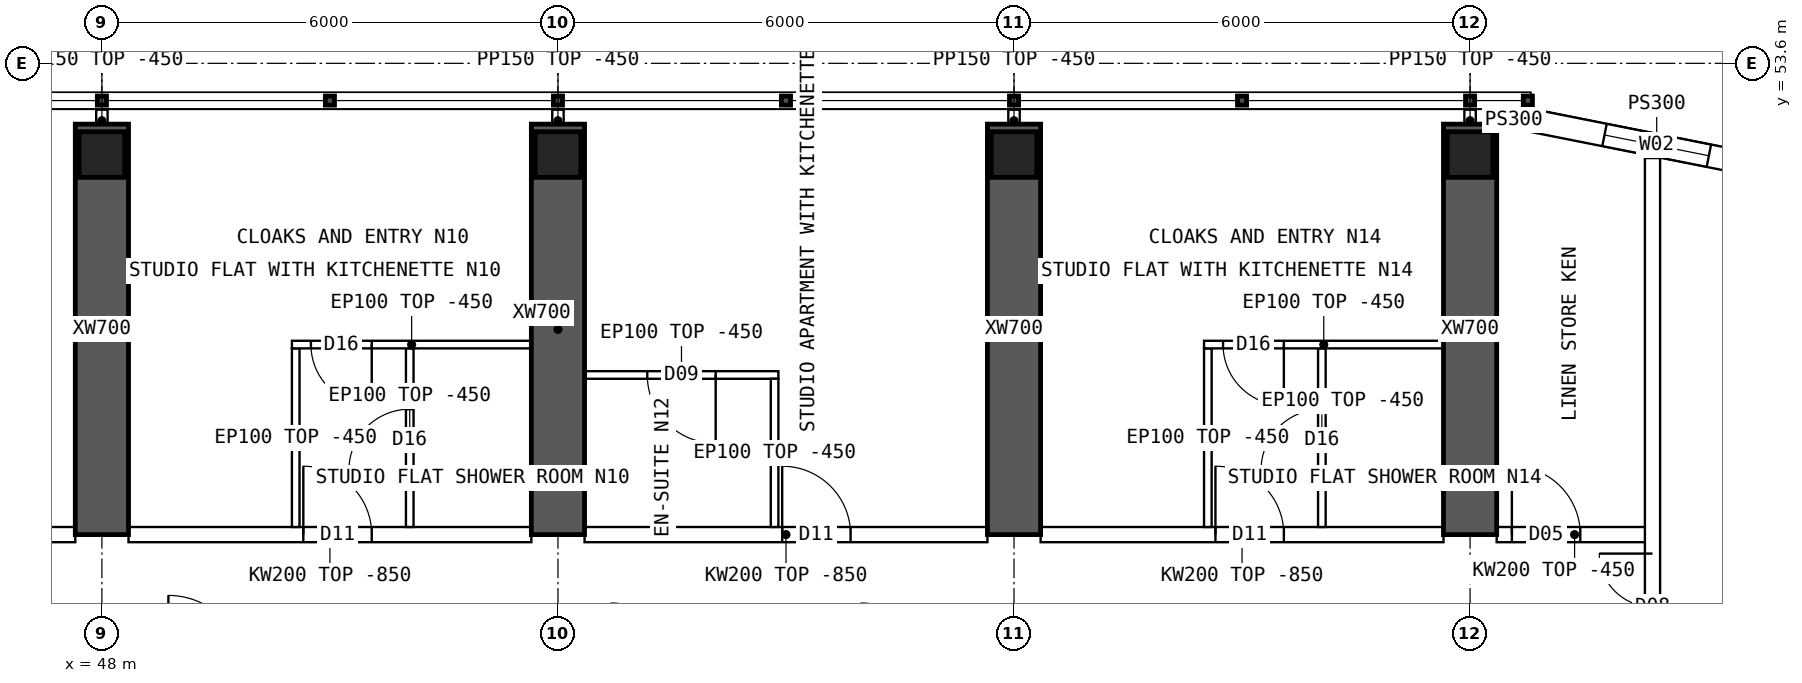
"""IFC4 building model, lengths in metres.
Left out: names, types, materials, properties, quantities, classifications, styles, units other than length and angle.
Written with IfcOpenShell. Run it as: python <this file> out.ifc"""

import sys

from ifc_helpers import new_model, si_unit, direction, frame, frame_2d, origin, origin_2d, place, context, subcontext, project, spatial, polyline, rectangle, hollow_rectangle, outline, extrude, element, fill, save


model = new_model("IFC4")
c1 = context("Model", 3, precision=1e-05, world=origin(), true_north=direction((0.0, 1.0)))
c2 = subcontext(c1, "Body", "Model", "MODEL_VIEW")
j1 = project(units=[si_unit("LENGTHUNIT", "METRE"), si_unit("PLANEANGLEUNIT", "RADIAN")], contexts=[c1])
p1 = place(None, origin())
s1 = spatial("IfcSite", under=j1, at=p1, CompositionType="ELEMENT")
p2 = place(p1, origin())
s2 = spatial("IfcBuilding", under=s1, at=p2, CompositionType="ELEMENT")
p3 = place(p2, frame((0.0, 0.0, 227.8)))
s3 = spatial("IfcBuildingStorey", under=s2, at=p3, CompositionType="ELEMENT", Elevation=227.8)
for number, where, z_axis, x_axis in (
    (1, (48.0, 52.4, 0.0), (0.0, 0.0, 1.0), (1.0, 0.0, 0.0)),
    (2, (54.0, 52.4, 0.0), (0.0, 0.0, 1.0), (1.0, 0.0, 0.0)),
    (3, (60.0, 52.4, 0.0), (0.0, 0.0, 1.0), (1.0, 0.0, 0.0)),
    (4, (66.0, 52.4, 0.0), (0.0, 0.0, 1.0), (1.0, 0.0, 0.0)),
):
    element("IfcColumn", number, at=place(p3, frame(where, z_axis=z_axis, x_axis=x_axis)), inside=s3, PredefinedType="COLUMN", context=c2, shape_type="SweptSolid", body=[
        extrude(hollow_rectangle(XDim=0.6, YDim=0.6, WallThickness=0.06, at=origin_2d()), origin(), (0.0, 0.0, 1.0), 3.75),
    ])
for number, where, z_axis, x_axis in (
    (5, (48.0, 47.4, 0.0), (0.0, 0.0, 1.0), (0.0, 1.0, 0.0)),
    (6, (54.0, 47.4, 0.0), (0.0, 0.0, 1.0), (0.0, 1.0, 0.0)),
    (7, (60.0, 47.4, 0.0), (0.0, 0.0, 1.0), (0.0, 1.0, 0.0)),
    (8, (66.0, 47.4, 0.0), (0.0, 0.0, 1.0), (0.0, 1.0, 0.0)),
):
    element("IfcWall", number, at=place(p3, frame(where, z_axis=z_axis, x_axis=x_axis)), inside=s3, PredefinedType="SHEAR", context=c2, shape_type="SweptSolid", body=[
        extrude(rectangle(XDim=5.4, YDim=0.7, at=frame_2d((2.7, 0.0))), origin(), (0.0, 0.0, 1.0), 3.75),
    ])
p4 = place(p3, frame((70.11, 52.192, 0.0), z_axis=(0.0, 0.0, 1.0), x_axis=(-0.98078325777, 0.195100490205, 0.0)))
e9 = element("IfcWall", 9, at=p4, inside=s3, PredefinedType="SOLIDWALL", context=c2, shape_type="SweptSolid", body=[
    extrude(outline(polyline([(-0.03, -0.15), (3.405, -0.15), (3.345, 0.15), (0.03, 0.15), (-0.03, -0.15)])), origin(), (0.0, 0.0, 1.0), 3.3),
])
p5 = place(p4, frame((0.988, 0.0, 0.9)))
e10 = element("IfcOpeningElement", 10, at=p5, cuts=e9, PredefinedType="OPENING", context=c2, shape_type="SweptSolid", body=[
    extrude(rectangle(XDim=1.4, YDim=1.8, at=frame_2d((0.7, 0.9))), frame((0.0, 0.16, 0.0), z_axis=(0.0, -1.0, 0.0), x_axis=(1.0, 0.0, 0.0)), (0.0, 0.0, 1.0), 0.32),
])
p6 = place(p3, frame((66.8, 52.85, 0.0), z_axis=(0.0, 0.0, 1.0), x_axis=(-1.0, 0.0, 0.0)))
e11 = element("IfcWall", 11, at=p6, inside=s3, PredefinedType="SOLIDWALL", context=c2, shape_type="SweptSolid", body=[
    extrude(rectangle(XDim=0.45, YDim=0.3, at=frame_2d((0.225, 0.0))), origin(), (0.0, 0.0, 1.0), 3.3),
])
p7 = place(p3, frame((42.35, 47.4, 0.0), z_axis=(0.0, 0.0, 1.0), x_axis=(1.0, 0.0, 0.0)))
e12 = element("IfcWall", 12, at=p7, inside=s3, PredefinedType="SOLIDWALL", context=c2, shape_type="SweptSolid", body=[
    extrude(outline(polyline([(0.0, 0.0), (5.3, 0.0), (5.3, 2.9), (0.0, 2.9), (0.0, 0.0)])), frame((0.0, 0.1, 0.0), z_axis=(0.0, -1.0, 0.0), x_axis=(1.0, 0.0, 0.0)), (0.0, 0.0, 1.0), 0.2),
])
p8 = place(p7, frame((2.6, 0.0, 0.0)))
e13 = element("IfcOpeningElement", 13, at=p8, cuts=e12, PredefinedType="OPENING", context=c2, shape_type="SweptSolid", body=[
    extrude(rectangle(XDim=0.9, YDim=2.1, at=frame_2d((0.45, 1.05))), frame((0.0, 0.11, 0.0), z_axis=(0.0, -1.0, 0.0), x_axis=(1.0, 0.0, 0.0)), (0.0, 0.0, 1.0), 0.22),
])
p9 = place(p3, frame((48.35, 47.4, 0.0), z_axis=(0.0, 0.0, 1.0), x_axis=(1.0, 0.0, 0.0)))
e14 = element("IfcWall", 14, at=p9, inside=s3, PredefinedType="SOLIDWALL", context=c2, shape_type="SweptSolid", body=[
    extrude(outline(polyline([(0.0, 0.0), (5.3, 0.0), (5.3, 2.9), (0.0, 2.9), (0.0, 0.0)])), frame((0.0, 0.1, 0.0), z_axis=(0.0, -1.0, 0.0), x_axis=(1.0, 0.0, 0.0)), (0.0, 0.0, 1.0), 0.2),
])
p10 = place(p9, frame((2.3, 0.0, 0.0)))
e15 = element("IfcOpeningElement", 15, at=p10, cuts=e14, PredefinedType="OPENING", context=c2, shape_type="SweptSolid", body=[
    extrude(rectangle(XDim=0.9, YDim=2.1, at=frame_2d((0.45, 1.05))), frame((0.0, 0.11, 0.0), z_axis=(0.0, -1.0, 0.0), x_axis=(1.0, 0.0, 0.0)), (0.0, 0.0, 1.0), 0.22),
])
p11 = place(p3, frame((54.35, 47.4, 0.0), z_axis=(0.0, 0.0, 1.0), x_axis=(1.0, 0.0, 0.0)))
e16 = element("IfcWall", 16, at=p11, inside=s3, PredefinedType="SOLIDWALL", context=c2, shape_type="SweptSolid", body=[
    extrude(outline(polyline([(0.0, 0.0), (5.3, 0.0), (5.3, 2.9), (0.0, 2.9), (0.0, 0.0)])), frame((0.0, 0.1, 0.0), z_axis=(0.0, -1.0, 0.0), x_axis=(1.0, 0.0, 0.0)), (0.0, 0.0, 1.0), 0.2),
])
p12 = place(p11, frame((2.6, 0.0, 0.0)))
e17 = element("IfcOpeningElement", 17, at=p12, cuts=e16, PredefinedType="OPENING", context=c2, shape_type="SweptSolid", body=[
    extrude(rectangle(XDim=0.9, YDim=2.1, at=frame_2d((0.45, 1.05))), frame((0.0, 0.11, 0.0), z_axis=(0.0, -1.0, 0.0), x_axis=(1.0, 0.0, 0.0)), (0.0, 0.0, 1.0), 0.22),
])
p13 = place(p3, frame((60.35, 47.4, 0.0), z_axis=(0.0, 0.0, 1.0), x_axis=(1.0, 0.0, 0.0)))
e18 = element("IfcWall", 18, at=p13, inside=s3, PredefinedType="SOLIDWALL", context=c2, shape_type="SweptSolid", body=[
    extrude(outline(polyline([(0.0, 0.0), (5.3, 0.0), (5.3, 2.9), (0.0, 2.9), (0.0, 0.0)])), frame((0.0, 0.1, 0.0), z_axis=(0.0, -1.0, 0.0), x_axis=(1.0, 0.0, 0.0)), (0.0, 0.0, 1.0), 0.2),
])
p14 = place(p13, frame((2.3, 0.0, 0.0)))
e19 = element("IfcOpeningElement", 19, at=p14, cuts=e18, PredefinedType="OPENING", context=c2, shape_type="SweptSolid", body=[
    extrude(rectangle(XDim=0.9, YDim=2.1, at=frame_2d((0.45, 1.05))), frame((0.0, 0.11, 0.0), z_axis=(0.0, -1.0, 0.0), x_axis=(1.0, 0.0, 0.0)), (0.0, 0.0, 1.0), 0.22),
])
p15 = place(p3, frame((66.35, 47.4, 0.0), z_axis=(0.0, 0.0, 1.0), x_axis=(1.0, 0.0, 0.0)))
e20 = element("IfcWall", 20, at=p15, inside=s3, PredefinedType="SOLIDWALL", context=c2, shape_type="SweptSolid", body=[
    extrude(rectangle(XDim=2.05, YDim=0.2, at=frame_2d((1.025, 0.0))), origin(), (0.0, 0.0, 1.0), 3.3),
])
p16 = place(p15, frame((0.2, 0.0, 0.0)))
e21 = element("IfcOpeningElement", 21, at=p16, cuts=e20, PredefinedType="OPENING", context=c2, shape_type="SweptSolid", body=[
    extrude(rectangle(XDim=0.9, YDim=2.1, at=frame_2d((0.45, 1.05))), frame((0.0, 0.11, 0.0), z_axis=(0.0, -1.0, 0.0), x_axis=(1.0, 0.0, 0.0)), (0.0, 0.0, 1.0), 0.22),
])
p17 = place(p3, frame((50.5, 49.9, 0.0), z_axis=(0.0, 0.0, 1.0), x_axis=(1.0, 0.0, 0.0)))
e22 = element("IfcWall", 22, at=p17, inside=s3, PredefinedType="PARTITIONING", context=c2, shape_type="SweptSolid", body=[
    extrude(rectangle(XDim=3.15, YDim=0.1, at=frame_2d((1.575, 0.0))), origin(), (0.0, 0.0, 1.0), 3.3),
])
p18 = place(p17, frame((0.25, 0.0, 0.0)))
e23 = element("IfcOpeningElement", 23, at=p18, cuts=e22, PredefinedType="OPENING", context=c2, shape_type="SweptSolid", body=[
    extrude(rectangle(XDim=0.8, YDim=2.1, at=frame_2d((0.4, 1.05))), frame((0.0, 0.06, 0.0), z_axis=(0.0, -1.0, 0.0), x_axis=(1.0, 0.0, 0.0)), (0.0, 0.0, 1.0), 0.12),
])
p19 = place(p3, frame((50.55, 49.85, 0.0), z_axis=(0.0, 0.0, 1.0), x_axis=(0.0, -1.0, 0.0)))
e24 = element("IfcWall", 24, at=p19, inside=s3, PredefinedType="PARTITIONING", context=c2, shape_type="SweptSolid", body=[
    extrude(outline(polyline([(0.0, 0.0), (2.35, 0.0), (2.35, 2.9), (2.302, 2.9), (2.3, 3.3), (0.0, 3.3), (0.0, 0.0)])), frame((0.0, 0.05, 0.0), z_axis=(0.0, -1.0, 0.0), x_axis=(1.0, 0.0, 0.0)), (0.0, 0.0, 1.0), 0.1),
])
p20 = place(p3, frame((52.05, 49.85, 0.0), z_axis=(0.0, 0.0, 1.0), x_axis=(0.0, -1.0, 0.0)))
e25 = element("IfcWall", 25, at=p20, inside=s3, PredefinedType="PARTITIONING", context=c2, shape_type="SweptSolid", body=[
    extrude(outline(polyline([(0.0, 0.0), (2.35, 0.0), (2.35, 2.9), (2.302, 2.9), (2.3, 3.3), (0.0, 3.3), (0.0, 0.0)])), frame((0.0, 0.05, 0.0), z_axis=(0.0, -1.0, 0.0), x_axis=(1.0, 0.0, 0.0)), (0.0, 0.0, 1.0), 0.1),
])
p21 = place(p20, frame((0.8, 0.0, 0.0)))
e26 = element("IfcOpeningElement", 26, at=p21, cuts=e25, PredefinedType="OPENING", context=c2, shape_type="SweptSolid", body=[
    extrude(rectangle(XDim=0.8, YDim=2.1, at=frame_2d((0.4, 1.05))), frame((0.0, 0.06, 0.0), z_axis=(0.0, -1.0, 0.0), x_axis=(1.0, 0.0, 0.0)), (0.0, 0.0, 1.0), 0.12),
])
p22 = place(p3, frame((54.35, 49.5, 0.0), z_axis=(0.0, 0.0, 1.0), x_axis=(1.0, 0.0, 0.0)))
e27 = element("IfcWall", 27, at=p22, inside=s3, PredefinedType="PARTITIONING", context=c2, shape_type="SweptSolid", body=[
    extrude(rectangle(XDim=2.55, YDim=0.1, at=frame_2d((1.275, 0.0))), origin(), (0.0, 0.0, 1.0), 3.3),
])
p23 = place(p22, frame((0.825, 0.0, 0.0)))
e28 = element("IfcOpeningElement", 28, at=p23, cuts=e27, PredefinedType="OPENING", context=c2, shape_type="SweptSolid", body=[
    extrude(rectangle(XDim=0.9, YDim=2.1, at=frame_2d((0.45, 1.05))), frame((0.0, 0.06, 0.0), z_axis=(0.0, -1.0, 0.0), x_axis=(1.0, 0.0, 0.0)), (0.0, 0.0, 1.0), 0.12),
])
p24 = place(p3, frame((56.85, 49.45, 0.0), z_axis=(0.0, 0.0, 1.0), x_axis=(0.0, -1.0, 0.0)))
e29 = element("IfcWall", 29, at=p24, inside=s3, PredefinedType="PARTITIONING", context=c2, shape_type="SweptSolid", body=[
    extrude(outline(polyline([(0.0, 0.0), (1.95, 0.0), (1.95, 2.9), (1.902, 2.9), (1.9, 3.3), (0.0, 3.3), (0.0, 0.0)])), frame((0.0, 0.05, 0.0), z_axis=(0.0, -1.0, 0.0), x_axis=(1.0, 0.0, 0.0)), (0.0, 0.0, 1.0), 0.1),
])
p25 = place(p3, frame((62.5, 49.9, 0.0), z_axis=(0.0, 0.0, 1.0), x_axis=(1.0, 0.0, 0.0)))
e30 = element("IfcWall", 30, at=p25, inside=s3, PredefinedType="PARTITIONING", context=c2, shape_type="SweptSolid", body=[
    extrude(rectangle(XDim=3.15, YDim=0.1, at=frame_2d((1.575, 0.0))), origin(), (0.0, 0.0, 1.0), 3.3),
])
p26 = place(p25, frame((0.25, 0.0, 0.0)))
e31 = element("IfcOpeningElement", 31, at=p26, cuts=e30, PredefinedType="OPENING", context=c2, shape_type="SweptSolid", body=[
    extrude(rectangle(XDim=0.8, YDim=2.1, at=frame_2d((0.4, 1.05))), frame((0.0, 0.06, 0.0), z_axis=(0.0, -1.0, 0.0), x_axis=(1.0, 0.0, 0.0)), (0.0, 0.0, 1.0), 0.12),
])
p27 = place(p3, frame((62.55, 49.85, 0.0), z_axis=(0.0, 0.0, 1.0), x_axis=(0.0, -1.0, 0.0)))
e32 = element("IfcWall", 32, at=p27, inside=s3, PredefinedType="PARTITIONING", context=c2, shape_type="SweptSolid", body=[
    extrude(outline(polyline([(0.0, 0.0), (2.35, 0.0), (2.35, 2.9), (2.302, 2.9), (2.3, 3.3), (0.0, 3.3), (0.0, 0.0)])), frame((0.0, 0.05, 0.0), z_axis=(0.0, -1.0, 0.0), x_axis=(1.0, 0.0, 0.0)), (0.0, 0.0, 1.0), 0.1),
])
p28 = place(p3, frame((64.05, 49.85, 0.0), z_axis=(0.0, 0.0, 1.0), x_axis=(0.0, -1.0, 0.0)))
e33 = element("IfcWall", 33, at=p28, inside=s3, PredefinedType="PARTITIONING", context=c2, shape_type="SweptSolid", body=[
    extrude(outline(polyline([(0.0, 0.0), (2.35, 0.0), (2.35, 2.9), (2.302, 2.9), (2.3, 3.3), (0.0, 3.3), (0.0, 0.0)])), frame((0.0, 0.05, 0.0), z_axis=(0.0, -1.0, 0.0), x_axis=(1.0, 0.0, 0.0)), (0.0, 0.0, 1.0), 0.1),
])
p29 = place(p28, frame((0.8, 0.0, 0.0)))
e34 = element("IfcOpeningElement", 34, at=p29, cuts=e33, PredefinedType="OPENING", context=c2, shape_type="SweptSolid", body=[
    extrude(rectangle(XDim=0.8, YDim=2.1, at=frame_2d((0.4, 1.05))), frame((0.0, 0.06, 0.0), z_axis=(0.0, -1.0, 0.0), x_axis=(1.0, 0.0, 0.0)), (0.0, 0.0, 1.0), 0.12),
])
p30 = place(p3, frame((68.4, 11.646, 0.0), z_axis=(0.0, 0.0, 1.0), x_axis=(0.0, 1.0, 0.0)))
e35 = element("IfcWall", 35, at=p30, inside=s3, PredefinedType="SOLIDWALL", context=c2, shape_type="SweptSolid", body=[
    extrude(rectangle(XDim=40.708, YDim=0.2, at=frame_2d((20.354, 0.0))), origin(), (0.0, 0.0, 1.0), 3.3),
])
p31 = place(p30, frame((13.434, 0.0, 0.0)))
e36 = element("IfcOpeningElement", 36, at=p31, cuts=e35, PredefinedType="OPENING", context=c2, shape_type="SweptSolid", body=[
    extrude(rectangle(XDim=1.2, YDim=2.1, at=frame_2d((0.6, 1.05))), frame((0.0, 0.11, 0.0), z_axis=(0.0, -1.0, 0.0), x_axis=(1.0, 0.0, 0.0)), (0.0, 0.0, 1.0), 0.22),
])
p32 = place(p30, frame((21.194, 0.0, 0.0)))
e37 = element("IfcOpeningElement", 37, at=p32, cuts=e35, PredefinedType="OPENING", context=c2, shape_type="SweptSolid", body=[
    extrude(rectangle(XDim=1.2, YDim=2.1, at=frame_2d((0.6, 1.05))), frame((0.0, 0.11, 0.0), z_axis=(0.0, -1.0, 0.0), x_axis=(1.0, 0.0, 0.0)), (0.0, 0.0, 1.0), 0.22),
])
p33 = place(p30, frame((5.104, 0.0, 0.0)))
e38 = element("IfcOpeningElement", 38, at=p33, cuts=e35, PredefinedType="OPENING", context=c2, shape_type="SweptSolid", body=[
    extrude(rectangle(XDim=1.4, YDim=2.1, at=frame_2d((0.7, 1.05))), frame((0.0, 0.11, 0.0), z_axis=(0.0, -1.0, 0.0), x_axis=(1.0, 0.0, 0.0)), (0.0, 0.0, 1.0), 0.22),
])
p34 = place(p30, frame((34.104, 0.0, 0.0)))
e39 = element("IfcOpeningElement", 39, at=p34, cuts=e35, PredefinedType="OPENING", context=c2, shape_type="SweptSolid", body=[
    extrude(rectangle(XDim=1.4, YDim=2.1, at=frame_2d((0.7, 1.05))), frame((0.0, 0.11, 0.0), z_axis=(0.0, -1.0, 0.0), x_axis=(1.0, 0.0, 0.0)), (0.0, 0.0, 1.0), 0.22),
])
for number, where, z_axis, x_axis in (
    (40, (48.0, 52.7, 0.0), (0.0, 0.0, 1.0), (0.0, 1.0, 0.0)),
    (41, (54.0, 52.7, 0.0), (0.0, 0.0, 1.0), (0.0, 1.0, 0.0)),
    (42, (60.0, 52.7, 0.0), (0.0, 0.0, 1.0), (0.0, 1.0, 0.0)),
    (43, (66.0, 52.7, 0.0), (0.0, 0.0, 1.0), (0.0, 1.0, 0.0)),
):
    element("IfcWall", number, at=place(p3, frame(where, z_axis=z_axis, x_axis=x_axis)), inside=s3, PredefinedType="PARTITIONING", context=c2, shape_type="SweptSolid", body=[
        extrude(rectangle(XDim=0.29, YDim=0.15, at=frame_2d((0.145, 0.0))), origin(), (0.0, 0.0, 1.0), 3.3),
    ])
p35 = place(p5, origin())
e44 = element("IfcWindow", 44, at=p35, inside=s3, PartitioningType="SINGLE_PANEL", PredefinedType="WINDOW", context=c2, shape_type="SweptSolid", body=[
    extrude(rectangle(XDim=1.4, YDim=1.8, at=frame_2d((0.7, 0.9))), frame((0.0, 0.03, 0.0), z_axis=(0.0, -1.0, 0.0), x_axis=(1.0, 0.0, 0.0)), (0.0, 0.0, 1.0), 0.06),
])
fill(e10, e44)
p36 = place(p18, origin())
e45 = element("IfcDoor", 45, at=p36, inside=s3, OperationType="SINGLE_SWING_RIGHT", PredefinedType="DOOR", context=c2, shape_type="SweptSolid", body=[
    extrude(rectangle(XDim=0.8, YDim=2.1, at=frame_2d((0.4, 1.05))), frame((0.0, 0.025, 0.0), z_axis=(0.0, -1.0, 0.0), x_axis=(1.0, 0.0, 0.0)), (0.0, 0.0, 1.0), 0.05),
])
fill(e23, e45)
p37 = place(p21, origin())
e46 = element("IfcDoor", 46, at=p37, inside=s3, OperationType="SINGLE_SWING_RIGHT", PredefinedType="DOOR", context=c2, shape_type="SweptSolid", body=[
    extrude(rectangle(XDim=0.8, YDim=2.1, at=frame_2d((0.4, 1.05))), frame((0.0, 0.025, 0.0), z_axis=(0.0, -1.0, 0.0), x_axis=(1.0, 0.0, 0.0)), (0.0, 0.0, 1.0), 0.05),
])
fill(e26, e46)
p38 = place(p10, origin())
e47 = element("IfcDoor", 47, at=p38, inside=s3, OperationType="SINGLE_SWING_LEFT", PredefinedType="DOOR", context=c2, shape_type="SweptSolid", body=[
    extrude(rectangle(XDim=0.9, YDim=2.1, at=frame_2d((0.45, 1.05))), frame((0.0, 0.025, 0.0), z_axis=(0.0, -1.0, 0.0), x_axis=(1.0, 0.0, 0.0)), (0.0, 0.0, 1.0), 0.05),
])
fill(e15, e47)
p39 = place(p23, origin())
e48 = element("IfcDoor", 48, at=p39, inside=s3, OperationType="SINGLE_SWING_RIGHT", PredefinedType="DOOR", context=c2, shape_type="SweptSolid", body=[
    extrude(rectangle(XDim=0.9, YDim=2.1, at=frame_2d((0.45, 1.05))), frame((0.0, 0.025, 0.0), z_axis=(0.0, -1.0, 0.0), x_axis=(1.0, 0.0, 0.0)), (0.0, 0.0, 1.0), 0.05),
])
fill(e28, e48)
p40 = place(p12, origin())
e49 = element("IfcDoor", 49, at=p40, inside=s3, OperationType="SINGLE_SWING_LEFT", PredefinedType="DOOR", context=c2, shape_type="SweptSolid", body=[
    extrude(rectangle(XDim=0.9, YDim=2.1, at=frame_2d((0.45, 1.05))), frame((0.0, 0.025, 0.0), z_axis=(0.0, -1.0, 0.0), x_axis=(1.0, 0.0, 0.0)), (0.0, 0.0, 1.0), 0.05),
])
fill(e17, e49)
p41 = place(p26, origin())
e50 = element("IfcDoor", 50, at=p41, inside=s3, OperationType="SINGLE_SWING_RIGHT", PredefinedType="DOOR", context=c2, shape_type="SweptSolid", body=[
    extrude(rectangle(XDim=0.8, YDim=2.1, at=frame_2d((0.4, 1.05))), frame((0.0, 0.025, 0.0), z_axis=(0.0, -1.0, 0.0), x_axis=(1.0, 0.0, 0.0)), (0.0, 0.0, 1.0), 0.05),
])
fill(e31, e50)
p42 = place(p29, origin())
e51 = element("IfcDoor", 51, at=p42, inside=s3, OperationType="SINGLE_SWING_RIGHT", PredefinedType="DOOR", context=c2, shape_type="SweptSolid", body=[
    extrude(rectangle(XDim=0.8, YDim=2.1, at=frame_2d((0.4, 1.05))), frame((0.0, 0.025, 0.0), z_axis=(0.0, -1.0, 0.0), x_axis=(1.0, 0.0, 0.0)), (0.0, 0.0, 1.0), 0.05),
])
fill(e34, e51)
p43 = place(p14, origin())
e52 = element("IfcDoor", 52, at=p43, inside=s3, OperationType="SINGLE_SWING_LEFT", PredefinedType="DOOR", context=c2, shape_type="SweptSolid", body=[
    extrude(rectangle(XDim=0.9, YDim=2.1, at=frame_2d((0.45, 1.05))), frame((0.0, 0.025, 0.0), z_axis=(0.0, -1.0, 0.0), x_axis=(1.0, 0.0, 0.0)), (0.0, 0.0, 1.0), 0.05),
])
fill(e19, e52)
p44 = place(p34, origin())
e53 = element("IfcDoor", 53, at=p44, inside=s3, OperationType="DOUBLE_DOOR_SINGLE_SWING", PredefinedType="DOOR", context=c2, shape_type="SweptSolid", body=[
    extrude(rectangle(XDim=1.4, YDim=2.1, at=frame_2d((0.7, 1.05))), frame((0.0, 0.025, 0.0), z_axis=(0.0, -1.0, 0.0), x_axis=(1.0, 0.0, 0.0)), (0.0, 0.0, 1.0), 0.05),
])
fill(e39, e53)
p45 = place(p16, origin())
e54 = element("IfcDoor", 54, at=p45, inside=s3, OperationType="SINGLE_SWING_LEFT", PredefinedType="DOOR", context=c2, shape_type="SweptSolid", body=[
    extrude(rectangle(XDim=0.9, YDim=2.1, at=frame_2d((0.45, 1.05))), frame((0.0, 0.025, 0.0), z_axis=(0.0, -1.0, 0.0), x_axis=(1.0, 0.0, 0.0)), (0.0, 0.0, 1.0), 0.05),
])
fill(e21, e54)
save(model, sys.argv[1])
